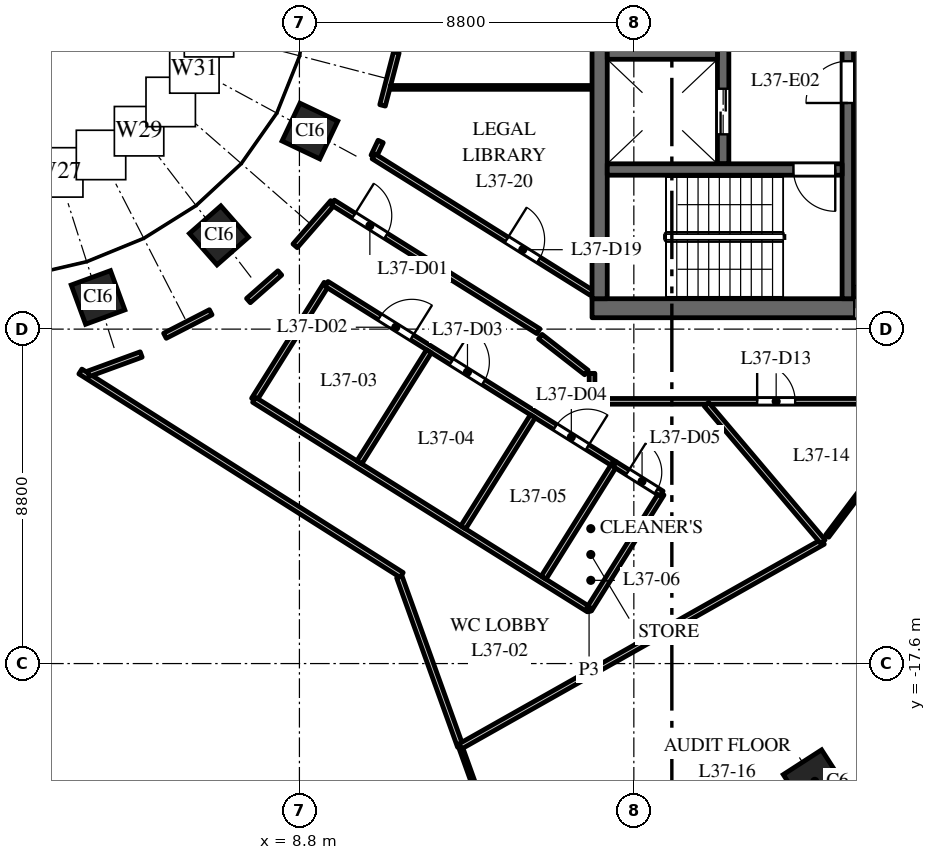
"""IFC4 building model, lengths in metres.
Left out: names, types, materials, properties, quantities, classifications, styles, units other than length and angle.
Written with IfcOpenShell. Run it as: python <this file> out.ifc"""

import sys

from ifc_helpers import new_model, si_unit, direction, frame, frame_2d, origin, origin_2d, place, context, subcontext, project, spatial, rectangle, extrude, element, fill, save


model = new_model("IFC4")
c1 = context("Model", 3, precision=1e-05, world=origin(), true_north=direction((0.0, 1.0)))
c2 = subcontext(c1, "Body", "Model", "MODEL_VIEW")
j1 = project(units=[si_unit("LENGTHUNIT", "METRE"), si_unit("PLANEANGLEUNIT", "RADIAN")], contexts=[c1])
p1 = place(None, origin())
s1 = spatial("IfcSite", under=j1, at=p1, CompositionType="ELEMENT")
p2 = place(p1, origin())
s2 = spatial("IfcBuilding", under=s1, at=p2, CompositionType="ELEMENT")
p3 = place(p2, frame((0.0, 0.0, 162.0)))
s3 = spatial("IfcBuildingStorey", under=s2, at=p3, CompositionType="ELEMENT", Elevation=162.0)
p4 = place(p3, frame((22.362, -20.7, 0.0), z_axis=(0.0, 0.0, 1.0), x_axis=(0.840247639643, 0.542202825586, 0.0)))
e1 = element("IfcColumn", 1, at=p4, inside=s3, PredefinedType="COLUMN", context=c2, shape_type="SweptSolid", body=[
    extrude(rectangle(XDim=1.2, YDim=1.2, at=origin_2d()), origin(), (0.0, 0.0, 1.0), 4.0),
])
for number, where, z_axis, x_axis in (
    (2, (3.501, -7.967, 0.0), (0.0, 0.0, 1.0), (0.939, 0.344, 0.0)),
    (3, (6.682, -6.334, 0.0), (0.0, 0.0, 1.0), (0.751, 0.66, 0.0)),
    (4, (9.076, -3.588, 0.0), (0.0, 0.0, 1.0), (0.429, 0.903, 0.0)),
):
    element("IfcColumn", number, at=place(p3, frame(where, z_axis=z_axis, x_axis=x_axis)), inside=s3, PredefinedType="COLUMN", context=c2, shape_type="SweptSolid", body=[
        extrude(rectangle(XDim=1.1, YDim=1.1, at=origin_2d()), origin(), (0.0, 0.0, 1.0), 4.0),
    ])
p5 = place(p3, frame((16.5, -8.25, 0.0), z_axis=(0.0, 0.0, 1.0), x_axis=(1.0, 0.0, 0.0)))
e5 = element("IfcWall", 5, at=p5, inside=s3, PredefinedType="SHEAR", context=c2, shape_type="SweptSolid", body=[
    extrude(rectangle(XDim=15.0, YDim=0.5, at=frame_2d((7.5, 0.0))), origin(), (0.0, 0.0, 1.0), 3.7),
])
p6 = place(p5, frame((6.9, 0.0, 0.0)))
e6 = element("IfcOpeningElement", 6, at=p6, cuts=e5, PredefinedType="OPENING", context=c2, shape_type="SweptSolid", body=[
    extrude(rectangle(XDim=1.2, YDim=2.1, at=frame_2d((0.6, 1.05))), frame((0.0, 0.26, 0.0), z_axis=(0.0, -1.0, 0.0), x_axis=(1.0, 0.0, 0.0)), (0.0, 0.0, 1.0), 0.52),
])
p7 = place(p5, frame((12.425, 0.0, 0.0)))
e7 = element("IfcOpeningElement", 7, at=p7, cuts=e5, PredefinedType="OPENING", context=c2, shape_type="SweptSolid", body=[
    extrude(rectangle(XDim=0.9, YDim=2.1, at=frame_2d((0.45, 1.05))), frame((0.0, 0.26, 0.0), z_axis=(0.0, -1.0, 0.0), x_axis=(1.0, 0.0, 0.0)), (0.0, 0.0, 1.0), 0.52),
])
p8 = place(p3, frame((19.95, -4.45, 0.0), z_axis=(0.0, 0.0, 1.0), x_axis=(0.0, 1.0, 0.0)))
e8 = element("IfcWall", 8, at=p8, inside=s3, PredefinedType="SHEAR", context=c2, shape_type="SweptSolid", body=[
    extrude(rectangle(XDim=8.9, YDim=0.3, at=frame_2d((4.45, 0.0))), origin(), (0.0, 0.0, 1.0), 3.7),
])
p9 = place(p8, frame((0.775, 0.0, 0.0)))
e9 = element("IfcOpeningElement", 9, at=p9, cuts=e8, PredefinedType="OPENING", context=c2, shape_type="SweptSolid", body=[
    extrude(rectangle(XDim=1.2, YDim=2.1, at=frame_2d((0.6, 1.05))), frame((0.0, 0.16, 0.0), z_axis=(0.0, -1.0, 0.0), x_axis=(1.0, 0.0, 0.0)), (0.0, 0.0, 1.0), 0.32),
])
p10 = place(p8, frame((4.675, 0.0, 0.0)))
e10 = element("IfcOpeningElement", 10, at=p10, cuts=e8, PredefinedType="OPENING", context=c2, shape_type="SweptSolid", body=[
    extrude(rectangle(XDim=1.1, YDim=2.1, at=frame_2d((0.55, 1.05))), frame((0.0, 0.16, 0.0), z_axis=(0.0, -1.0, 0.0), x_axis=(1.0, 0.0, 0.0)), (0.0, 0.0, 1.0), 0.32),
])
p11 = place(p8, frame((7.25, 0.0, 0.0)))
e11 = element("IfcOpeningElement", 11, at=p11, cuts=e8, PredefinedType="OPENING", context=c2, shape_type="SweptSolid", body=[
    extrude(rectangle(XDim=1.1, YDim=2.1, at=frame_2d((0.55, 1.05))), frame((0.0, 0.16, 0.0), z_axis=(0.0, -1.0, 0.0), x_axis=(1.0, 0.0, 0.0)), (0.0, 0.0, 1.0), 0.32),
])
p12 = place(p3, frame((16.7, -8.0, 0.0), z_axis=(0.0, 0.0, 1.0), x_axis=(0.0, 1.0, 0.0)))
e12 = element("IfcWall", 12, at=p12, inside=s3, PredefinedType="SHEAR", context=c2, shape_type="SweptSolid", body=[
    extrude(rectangle(XDim=16.0, YDim=0.4, at=frame_2d((8.0, 0.0))), origin(), (0.0, 0.0, 1.0), 3.7),
])
p13 = place(p3, frame((16.9, -1.075, 0.0), z_axis=(0.0, 0.0, 1.0), x_axis=(1.0, 0.0, 0.0)))
e13 = element("IfcWall", 13, at=p13, inside=s3, PredefinedType="SHEAR", context=c2, shape_type="SweptSolid", body=[
    extrude(rectangle(XDim=2.9, YDim=1.25, at=frame_2d((1.45, 0.0))), origin(), (0.0, 0.0, 1.0), 3.7),
])
p14 = place(p3, frame((23.23, -8.0, 0.0), z_axis=(0.0, 0.0, 1.0), x_axis=(0.0, 1.0, 0.0)))
e14 = element("IfcWall", 14, at=p14, inside=s3, PredefinedType="SHEAR", context=c2, shape_type="SweptSolid", body=[
    extrude(rectangle(XDim=7.875, YDim=0.3, at=frame_2d((3.938, 0.0))), origin(), (0.0, 0.0, 1.0), 3.7),
])
p15 = place(p14, frame((5.15, 0.0, 0.0)))
e15 = element("IfcOpeningElement", 15, at=p15, cuts=e14, PredefinedType="OPENING", context=c2, shape_type="SweptSolid", body=[
    extrude(rectangle(XDim=1.1, YDim=2.1, at=frame_2d((0.55, 1.05))), frame((0.0, 0.16, 0.0), z_axis=(0.0, -1.0, 0.0), x_axis=(1.0, 0.0, 0.0)), (0.0, 0.0, 1.0), 0.32),
])
p16 = place(p3, frame((16.9, -4.6, 0.0), z_axis=(0.0, 0.0, 1.0), x_axis=(1.0, 0.0, 0.0)))
e16 = element("IfcWall", 16, at=p16, inside=s3, PredefinedType="SHEAR", context=c2, shape_type="SweptSolid", body=[
    extrude(rectangle(XDim=6.18, YDim=0.3, at=frame_2d((3.09, 0.0))), origin(), (0.0, 0.0, 1.0), 3.7),
])
p17 = place(p16, frame((4.9, 0.0, 0.0)))
e17 = element("IfcOpeningElement", 17, at=p17, cuts=e16, PredefinedType="OPENING", context=c2, shape_type="SweptSolid", body=[
    extrude(rectangle(XDim=1.1, YDim=2.1, at=frame_2d((0.55, 1.05))), frame((0.0, 0.16, 0.0), z_axis=(0.0, -1.0, 0.0), x_axis=(1.0, 0.0, 0.0)), (0.0, 0.0, 1.0), 0.32),
])
p18 = place(p3, frame((3.036, -9.915, 0.0), z_axis=(0.0, 0.0, 1.0), x_axis=(0.844814664865, -0.535059045367, 0.0)))
e18 = element("IfcWall", 18, at=p18, inside=s3, PredefinedType="PARTITIONING", context=c2, shape_type="SweptSolid", body=[
    extrude(rectangle(XDim=10.008, YDim=0.15, at=frame_2d((5.004, 0.0))), origin(), (0.0, 0.0, 1.0), 2.85),
])
p19 = place(p3, frame((3.245, -9.977, 0.0), z_axis=(0.0, 0.0, 1.0), x_axis=(0.939083928338, 0.343687904263, 0.0)))
e19 = element("IfcWall", 19, at=p19, inside=s3, PredefinedType="PARTITIONING", context=c2, shape_type="SweptSolid", body=[
    extrude(rectangle(XDim=1.481, YDim=0.15, at=frame_2d((0.741, 0.0))), origin(), (0.0, 0.0, 1.0), 3.7),
])
p20 = place(p3, frame((5.261, -8.975, 0.0), z_axis=(0.0, 0.0, 1.0), x_axis=(0.889472002788, 0.456989667559, 0.0)))
e20 = element("IfcWall", 20, at=p20, inside=s3, PredefinedType="PARTITIONING", context=c2, shape_type="SweptSolid", body=[
    extrude(rectangle(XDim=1.355, YDim=0.15, at=frame_2d((0.677, 0.0))), origin(), (0.0, 0.0, 1.0), 2.85),
])
p21 = place(p3, frame((7.458, -8.049, 0.0), z_axis=(0.0, 0.0, 1.0), x_axis=(0.75060787095, 0.660747927782, 0.0)))
e21 = element("IfcWall", 21, at=p21, inside=s3, PredefinedType="PARTITIONING", context=c2, shape_type="SweptSolid", body=[
    extrude(rectangle(XDim=1.1, YDim=0.15, at=frame_2d((0.55, 0.0))), origin(), (0.0, 0.0, 1.0), 3.7),
])
p22 = place(p3, frame((7.605, -10.659, 0.0), z_axis=(0.0, 0.0, 1.0), x_axis=(0.530602380468, 0.847620855006, 0.0)))
e22 = element("IfcWall", 22, at=p22, inside=s3, PredefinedType="PARTITIONING", context=c2, shape_type="SweptSolid", body=[
    extrude(rectangle(XDim=3.6, YDim=0.15, at=frame_2d((1.8, 0.0))), origin(), (0.0, 0.0, 1.0), 3.7),
])
p23 = place(p3, frame((7.608, -10.661, 0.0), z_axis=(0.0, 0.0, 1.0), x_axis=(0.847562482532, -0.530695617284, 0.0)))
e23 = element("IfcWall", 23, at=p23, inside=s3, PredefinedType="PARTITIONING", context=c2, shape_type="SweptSolid", body=[
    extrude(rectangle(XDim=10.392, YDim=0.15, at=frame_2d((5.196, 0.0))), origin(), (0.0, 0.0, 1.0), 3.7),
])
p24 = place(p3, frame((8.687, -6.609, 0.0), z_axis=(0.0, 0.0, 1.0), x_axis=(0.656454677423, 0.75436546613, 0.0)))
e24 = element("IfcWall", 24, at=p24, inside=s3, PredefinedType="PARTITIONING", context=c2, shape_type="SweptSolid", body=[
    extrude(rectangle(XDim=1.511, YDim=0.15, at=frame_2d((0.755, 0.0))), origin(), (0.0, 0.0, 1.0), 3.7),
])
p25 = place(p3, frame((9.514, -7.61, 0.0), z_axis=(0.0, 0.0, 1.0), x_axis=(0.847740567707, -0.530411095155, 0.0)))
e25 = element("IfcWall", 25, at=p25, inside=s3, PredefinedType="PARTITIONING", context=c2, shape_type="SweptSolid", body=[
    extrude(rectangle(XDim=8.944, YDim=0.15, at=frame_2d((4.472, 0.0))), origin(), (0.0, 0.0, 1.0), 3.7),
])
p26 = place(p25, frame((1.65, 0.0, 0.0)))
e26 = element("IfcOpeningElement", 26, at=p26, cuts=e25, PredefinedType="OPENING", context=c2, shape_type="SweptSolid", body=[
    extrude(rectangle(XDim=1.0, YDim=2.1, at=frame_2d((0.5, 1.05))), frame((0.0, 0.085, 0.0), z_axis=(0.0, -1.0, 0.0), x_axis=(1.0, 0.0, 0.0)), (0.0, 0.0, 1.0), 0.17),
])
p27 = place(p25, frame((3.874, 0.0, 0.0)))
e27 = element("IfcOpeningElement", 27, at=p27, cuts=e25, PredefinedType="OPENING", context=c2, shape_type="SweptSolid", body=[
    extrude(rectangle(XDim=1.0, YDim=2.1, at=frame_2d((0.5, 1.05))), frame((0.0, 0.085, 0.0), z_axis=(0.0, -1.0, 0.0), x_axis=(1.0, 0.0, 0.0)), (0.0, 0.0, 1.0), 0.17),
])
p28 = place(p25, frame((7.098, 0.0, 0.0)))
e28 = element("IfcOpeningElement", 28, at=p28, cuts=e25, PredefinedType="OPENING", context=c2, shape_type="SweptSolid", body=[
    extrude(rectangle(XDim=1.0, YDim=2.1, at=frame_2d((0.5, 1.05))), frame((0.0, 0.085, 0.0), z_axis=(0.0, -1.0, 0.0), x_axis=(1.0, 0.0, 0.0)), (0.0, 0.0, 1.0), 0.17),
])
p29 = place(p3, frame((9.679, -5.469, 0.0), z_axis=(0.0, 0.0, 1.0), x_axis=(0.847602682855, -0.530631408811, 0.0)))
e29 = element("IfcWall", 29, at=p29, inside=s3, PredefinedType="PARTITIONING", context=c2, shape_type="SweptSolid", body=[
    extrude(rectangle(XDim=6.383, YDim=0.15, at=frame_2d((3.191, 0.0))), origin(), (0.0, 0.0, 1.0), 3.7),
])
p30 = place(p29, frame((0.65, 0.0, 0.0)))
e30 = element("IfcOpeningElement", 30, at=p30, cuts=e29, PredefinedType="OPENING", context=c2, shape_type="SweptSolid", body=[
    extrude(rectangle(XDim=1.0, YDim=2.1, at=frame_2d((0.5, 1.05))), frame((0.0, 0.085, 0.0), z_axis=(0.0, -1.0, 0.0), x_axis=(1.0, 0.0, 0.0)), (0.0, 0.0, 1.0), 0.17),
])
p31 = place(p3, frame((10.377, -12.306, 0.0), z_axis=(0.0, 0.0, 1.0), x_axis=(0.530889428354, 0.847441098167, 0.0)))
e31 = element("IfcWall", 31, at=p31, inside=s3, PredefinedType="PARTITIONING", context=c2, shape_type="SweptSolid", body=[
    extrude(rectangle(XDim=3.449, YDim=0.15, at=frame_2d((1.725, 0.0))), origin(), (0.0, 0.0, 1.0), 3.7),
])
p32 = place(p3, frame((10.752, -4.254, 0.0), z_axis=(0.0, 0.0, 1.0), x_axis=(0.429758433873, 0.90294390109, 0.0)))
e32 = element("IfcWall", 32, at=p32, inside=s3, PredefinedType="PARTITIONING", context=c2, shape_type="SweptSolid", body=[
    extrude(rectangle(XDim=0.433, YDim=0.15, at=frame_2d((0.216, 0.0))), origin(), (0.0, 0.0, 1.0), 3.7),
])
p33 = place(p3, frame((10.752, -4.254, 0.0), z_axis=(0.0, 0.0, 1.0), x_axis=(0.847690706888, -0.530490777917, 0.0)))
e33 = element("IfcWall", 33, at=p33, inside=s3, PredefinedType="PARTITIONING", context=c2, shape_type="SweptSolid", body=[
    extrude(rectangle(XDim=6.781, YDim=0.15, at=frame_2d((3.39, 0.0))), origin(), (0.0, 0.0, 1.0), 3.7),
])
p34 = place(p33, frame((4.129, 0.0, 0.0)))
e34 = element("IfcOpeningElement", 34, at=p34, cuts=e33, PredefinedType="OPENING", context=c2, shape_type="SweptSolid", body=[
    extrude(rectangle(XDim=1.0, YDim=2.1, at=frame_2d((0.5, 1.05))), frame((0.0, 0.085, 0.0), z_axis=(0.0, -1.0, 0.0), x_axis=(1.0, 0.0, 0.0)), (0.0, 0.0, 1.0), 0.17),
])
p35 = place(p3, frame((10.987, -2.913, 0.0), z_axis=(0.0, 0.0, 1.0), x_axis=(0.252153395539, 0.967687276509, 0.0)))
e35 = element("IfcWall", 35, at=p35, inside=s3, PredefinedType="PARTITIONING", context=c2, shape_type="SweptSolid", body=[
    extrude(rectangle(XDim=1.444, YDim=0.15, at=frame_2d((0.722, 0.0))), origin(), (0.0, 0.0, 1.0), 3.7),
])
p36 = place(p3, frame((11.193, -2.44, 0.0), z_axis=(0.0, 0.0, 1.0), x_axis=(1.0, 0.0, 0.0)))
e36 = element("IfcWall", 36, at=p36, inside=s3, PredefinedType="PARTITIONING", context=c2, shape_type="SweptSolid", body=[
    extrude(rectangle(XDim=5.307, YDim=0.1, at=frame_2d((2.653, 0.0))), origin(), (0.0, 0.0, 1.0), 3.7),
])
p37 = place(p3, frame((11.429, -15.32, 0.0), z_axis=(0.0, 0.0, 1.0), x_axis=(0.338520464006, -0.940959029634, 0.0)))
e37 = element("IfcWall", 37, at=p37, inside=s3, PredefinedType="PARTITIONING", context=c2, shape_type="SweptSolid", body=[
    extrude(rectangle(XDim=4.735, YDim=0.15, at=frame_2d((2.368, 0.0))), origin(), (0.0, 0.0, 1.0), 3.7),
])
p38 = place(p3, frame((13.032, -19.776, 0.0), z_axis=(0.0, 0.0, 1.0), x_axis=(0.338352371411, -0.941019485856, 0.0)))
e38 = element("IfcWall", 38, at=p38, inside=s3, PredefinedType="PARTITIONING", context=c2, shape_type="SweptSolid", body=[
    extrude(rectangle(XDim=5.959, YDim=0.1, at=frame_2d((2.979, 0.0))), origin(), (0.0, 0.0, 1.0), 2.85),
])
p39 = place(p3, frame((13.034, -19.779, 0.0), z_axis=(0.0, 0.0, 1.0), x_axis=(0.870903388322, 0.491454258512, 0.0)))
e39 = element("IfcWall", 39, at=p39, inside=s3, PredefinedType="PARTITIONING", context=c2, shape_type="SweptSolid", body=[
    extrude(rectangle(XDim=10.955, YDim=0.15, at=frame_2d((5.478, 0.0))), origin(), (0.0, 0.0, 1.0), 3.7),
])
p40 = place(p3, frame((13.11, -14.017, 0.0), z_axis=(0.0, 0.0, 1.0), x_axis=(0.530603340991, 0.847620253727, 0.0)))
e40 = element("IfcWall", 40, at=p40, inside=s3, PredefinedType="PARTITIONING", context=c2, shape_type="SweptSolid", body=[
    extrude(rectangle(XDim=3.448, YDim=0.15, at=frame_2d((1.724, 0.0))), origin(), (0.0, 0.0, 1.0), 3.7),
])
p41 = place(p3, frame((15.226, -15.341, 0.0), z_axis=(0.0, 0.0, 1.0), x_axis=(0.530602850446, 0.847620560805, 0.0)))
e41 = element("IfcWall", 41, at=p41, inside=s3, PredefinedType="PARTITIONING", context=c2, shape_type="SweptSolid", body=[
    extrude(rectangle(XDim=3.524, YDim=0.15, at=frame_2d((1.762, 0.0))), origin(), (0.0, 0.0, 1.0), 3.7),
])
p42 = place(p3, frame((16.422, -16.175, 0.0), z_axis=(0.0, 0.0, 1.0), x_axis=(0.530578570881, 0.84763575911, 0.0)))
e42 = element("IfcWall", 42, at=p42, inside=s3, PredefinedType="PARTITIONING", context=c2, shape_type="SweptSolid", body=[
    extrude(rectangle(XDim=3.596, YDim=0.15, at=frame_2d((1.798, 0.0))), origin(), (0.0, 0.0, 1.0), 3.7),
])
p43 = place(p3, frame((16.5, -10.7, 0.0), z_axis=(0.0, 0.0, 1.0), x_axis=(0.0, 1.0, 0.0)))
e43 = element("IfcWall", 43, at=p43, inside=s3, PredefinedType="PARTITIONING", context=c2, shape_type="SweptSolid", body=[
    extrude(rectangle(XDim=0.736, YDim=0.15, at=frame_2d((0.368, 0.0))), origin(), (0.0, 0.0, 1.0), 3.7),
])
p44 = place(p3, frame((16.5, -10.7, 0.0), z_axis=(0.0, 0.0, 1.0), x_axis=(1.0, 0.0, 0.0)))
e44 = element("IfcWall", 44, at=p44, inside=s3, PredefinedType="PARTITIONING", context=c2, shape_type="SweptSolid", body=[
    extrude(rectangle(XDim=15.0, YDim=0.15, at=frame_2d((7.5, 0.0))), origin(), (0.0, 0.0, 1.0), 2.75),
])
p45 = place(p44, frame((4.345, 0.0, 0.0)))
e45 = element("IfcOpeningElement", 45, at=p45, cuts=e44, PredefinedType="OPENING", context=c2, shape_type="SweptSolid", body=[
    extrude(rectangle(XDim=1.0, YDim=2.1, at=frame_2d((0.5, 1.05))), frame((0.0, 0.085, 0.0), z_axis=(0.0, -1.0, 0.0), x_axis=(1.0, 0.0, 0.0)), (0.0, 0.0, 1.0), 0.17),
])
p46 = place(p44, frame((9.505, 0.0, 0.0)))
e46 = element("IfcOpeningElement", 46, at=p46, cuts=e44, PredefinedType="OPENING", context=c2, shape_type="SweptSolid", body=[
    extrude(rectangle(XDim=1.0, YDim=2.1, at=frame_2d((0.5, 1.05))), frame((0.0, 0.085, 0.0), z_axis=(0.0, -1.0, 0.0), x_axis=(1.0, 0.0, 0.0)), (0.0, 0.0, 1.0), 0.17),
])
p47 = place(p3, frame((17.096, -12.354, 0.0), z_axis=(0.0, 0.0, 1.0), x_axis=(0.847498728789, -0.530797423412, 0.0)))
e47 = element("IfcWall", 47, at=p47, inside=s3, PredefinedType="PARTITIONING", context=c2, shape_type="SweptSolid", body=[
    extrude(rectangle(XDim=1.456, YDim=0.15, at=frame_2d((0.728, 0.0))), origin(), (0.0, 0.0, 1.0), 3.7),
])
p48 = place(p47, frame((0.4, 0.0, 0.0)))
e48 = element("IfcOpeningElement", 48, at=p48, cuts=e47, PredefinedType="OPENING", context=c2, shape_type="SweptSolid", body=[
    extrude(rectangle(XDim=0.9, YDim=2.1, at=frame_2d((0.45, 1.05))), frame((0.0, 0.085, 0.0), z_axis=(0.0, -1.0, 0.0), x_axis=(1.0, 0.0, 0.0)), (0.0, 0.0, 1.0), 0.17),
])
p49 = place(p3, frame((19.511, -10.778, 0.0), z_axis=(0.0, 0.0, 1.0), x_axis=(0.646369264436, -0.763024753197, 0.0)))
e49 = element("IfcWall", 49, at=p49, inside=s3, PredefinedType="PARTITIONING", context=c2, shape_type="SweptSolid", body=[
    extrude(rectangle(XDim=4.74, YDim=0.15, at=frame_2d((2.37, 0.0))), origin(), (0.0, 0.0, 1.0), 3.7),
])
p50 = place(p3, frame((22.688, -14.245, 0.0), z_axis=(0.0, 0.0, 1.0), x_axis=(0.6020222506, 0.798479310804, 0.0)))
e50 = element("IfcWall", 50, at=p50, inside=s3, PredefinedType="PARTITIONING", context=c2, shape_type="SweptSolid", body=[
    extrude(rectangle(XDim=4.342, YDim=0.1, at=frame_2d((2.171, 0.0))), origin(), (0.0, 0.0, 1.0), 2.75),
])
p51 = place(p3, frame((16.352, -9.942, 0.0), z_axis=(0.0, 0.0, 1.0), x_axis=(-0.788950226826, 0.614457109643, 0.0)))
e51 = element("IfcWall", 51, at=p51, inside=s3, PredefinedType="PARTITIONING", context=c2, shape_type="SweptSolid", body=[
    extrude(rectangle(XDim=1.538, YDim=0.15, at=frame_2d((0.769, 0.0))), origin(), (0.0, 0.0, 1.0), 3.7),
])
p52 = place(p9, origin())
e52 = element("IfcDoor", 52, at=p52, inside=s3, OperationType="DOUBLE_DOOR_SLIDING", PredefinedType="DOOR", context=c2, shape_type="SweptSolid", body=[
    extrude(rectangle(XDim=1.2, YDim=2.1, at=frame_2d((0.6, 1.05))), frame((0.0, 0.025, 0.0), z_axis=(0.0, -1.0, 0.0), x_axis=(1.0, 0.0, 0.0)), (0.0, 0.0, 1.0), 0.05),
])
fill(e9, e52)
p53 = place(p17, origin())
e53 = element("IfcDoor", 53, at=p53, inside=s3, OperationType="SINGLE_SWING_RIGHT", PredefinedType="DOOR", context=c2, shape_type="SweptSolid", body=[
    extrude(rectangle(XDim=1.1, YDim=2.1, at=frame_2d((0.55, 1.05))), frame((0.0, 0.025, 0.0), z_axis=(0.0, -1.0, 0.0), x_axis=(1.0, 0.0, 0.0)), (0.0, 0.0, 1.0), 0.05),
])
fill(e17, e53)
p54 = place(p15, origin())
e54 = element("IfcDoor", 54, at=p54, inside=s3, OperationType="SINGLE_SWING_RIGHT", PredefinedType="DOOR", context=c2, shape_type="SweptSolid", body=[
    extrude(rectangle(XDim=1.1, YDim=2.1, at=frame_2d((0.55, 1.05))), frame((0.0, 0.025, 0.0), z_axis=(0.0, -1.0, 0.0), x_axis=(1.0, 0.0, 0.0)), (0.0, 0.0, 1.0), 0.05),
])
fill(e15, e54)
p55 = place(p6, origin())
e55 = element("IfcDoor", 55, at=p55, inside=s3, OperationType="DOUBLE_DOOR_DOUBLE_SWING", PredefinedType="DOOR", context=c2, shape_type="SweptSolid", body=[
    extrude(rectangle(XDim=1.2, YDim=2.1, at=frame_2d((0.6, 1.05))), frame((0.0, 0.025, 0.0), z_axis=(0.0, -1.0, 0.0), x_axis=(1.0, 0.0, 0.0)), (0.0, 0.0, 1.0), 0.05),
])
fill(e6, e55)
p56 = place(p30, origin())
e56 = element("IfcDoor", 56, at=p56, inside=s3, OperationType="SINGLE_SWING_LEFT", PredefinedType="DOOR", context=c2, shape_type="SweptSolid", body=[
    extrude(rectangle(XDim=1.0, YDim=2.1, at=frame_2d((0.5, 1.05))), frame((0.0, 0.025, 0.0), z_axis=(0.0, -1.0, 0.0), x_axis=(1.0, 0.0, 0.0)), (0.0, 0.0, 1.0), 0.05),
])
fill(e30, e56)
p57 = place(p26, origin())
e57 = element("IfcDoor", 57, at=p57, inside=s3, OperationType="SINGLE_SWING_RIGHT", PredefinedType="DOOR", context=c2, shape_type="SweptSolid", body=[
    extrude(rectangle(XDim=1.0, YDim=2.1, at=frame_2d((0.5, 1.05))), frame((0.0, 0.025, 0.0), z_axis=(0.0, -1.0, 0.0), x_axis=(1.0, 0.0, 0.0)), (0.0, 0.0, 1.0), 0.05),
])
fill(e26, e57)
p58 = place(p27, origin())
e58 = element("IfcDoor", 58, at=p58, inside=s3, OperationType="SINGLE_SWING_LEFT", PredefinedType="DOOR", context=c2, shape_type="SweptSolid", body=[
    extrude(rectangle(XDim=1.0, YDim=2.1, at=frame_2d((0.5, 1.05))), frame((0.0, 0.025, 0.0), z_axis=(0.0, -1.0, 0.0), x_axis=(1.0, 0.0, 0.0)), (0.0, 0.0, 1.0), 0.05),
])
fill(e27, e58)
p59 = place(p28, origin())
e59 = element("IfcDoor", 59, at=p59, inside=s3, OperationType="SINGLE_SWING_RIGHT", PredefinedType="DOOR", context=c2, shape_type="SweptSolid", body=[
    extrude(rectangle(XDim=1.0, YDim=2.1, at=frame_2d((0.5, 1.05))), frame((0.0, 0.025, 0.0), z_axis=(0.0, -1.0, 0.0), x_axis=(1.0, 0.0, 0.0)), (0.0, 0.0, 1.0), 0.05),
])
fill(e28, e59)
p60 = place(p48, origin())
e60 = element("IfcDoor", 60, at=p60, inside=s3, OperationType="SINGLE_SWING_LEFT", PredefinedType="DOOR", context=c2, shape_type="SweptSolid", body=[
    extrude(rectangle(XDim=0.9, YDim=2.1, at=frame_2d((0.45, 1.05))), frame((0.0, 0.025, 0.0), z_axis=(0.0, -1.0, 0.0), x_axis=(1.0, 0.0, 0.0)), (0.0, 0.0, 1.0), 0.05),
])
fill(e48, e60)
p61 = place(p45, origin())
e61 = element("IfcDoor", 61, at=p61, inside=s3, OperationType="SINGLE_SWING_LEFT", PredefinedType="DOOR", context=c2, shape_type="SweptSolid", body=[
    extrude(rectangle(XDim=1.0, YDim=2.1, at=frame_2d((0.5, 1.05))), frame((0.0, 0.025, 0.0), z_axis=(0.0, -1.0, 0.0), x_axis=(1.0, 0.0, 0.0)), (0.0, 0.0, 1.0), 0.05),
])
fill(e45, e61)
p62 = place(p34, origin())
e62 = element("IfcDoor", 62, at=p62, inside=s3, OperationType="SINGLE_SWING_LEFT", PredefinedType="DOOR", context=c2, shape_type="SweptSolid", body=[
    extrude(rectangle(XDim=1.0, YDim=2.1, at=frame_2d((0.5, 1.05))), frame((0.0, 0.025, 0.0), z_axis=(0.0, -1.0, 0.0), x_axis=(1.0, 0.0, 0.0)), (0.0, 0.0, 1.0), 0.05),
])
fill(e34, e62)
save(model, sys.argv[1])
